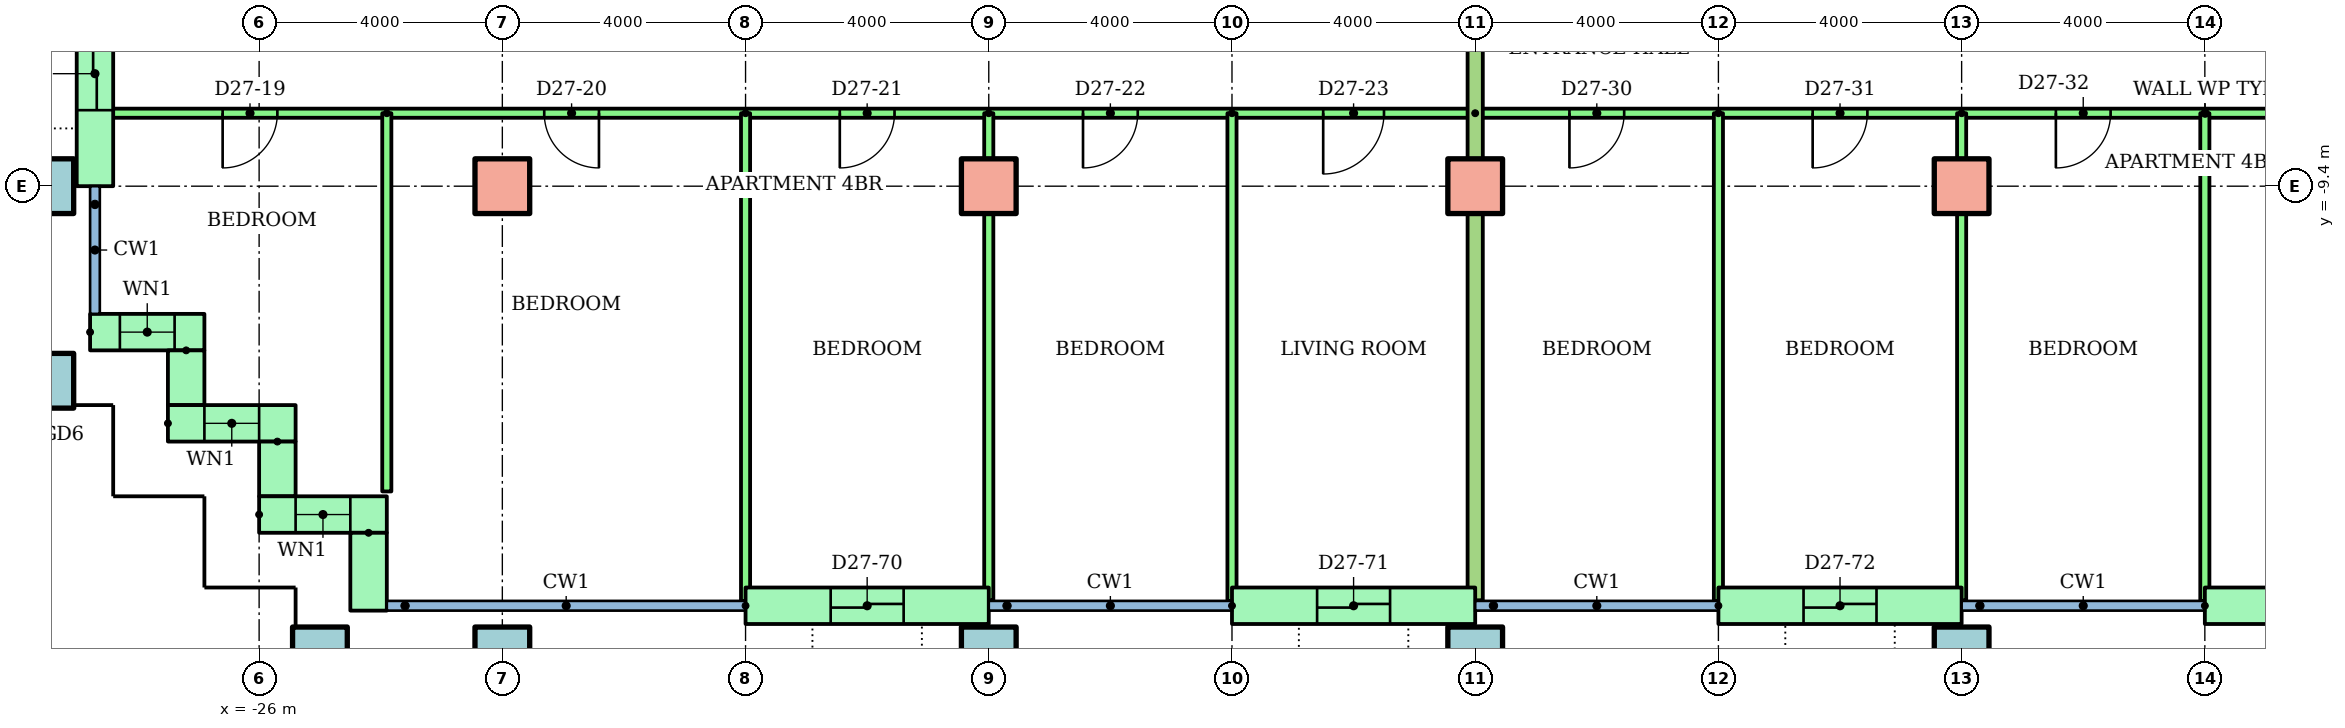
"""IFC4 building model, lengths in metres.
Left out: names, types, materials, properties, quantities, classifications, styles, units other than length and angle.
Written with IfcOpenShell. Run it as: python <this file> out.ifc"""

import sys

from ifc_helpers import new_model, si_unit, direction, frame, frame_2d, origin, origin_2d, place, context, subcontext, project, spatial, rectangle, hollow_rectangle, extrude, element, fill, save


model = new_model("IFC4")
c1 = context("Model", 3, precision=1e-05, world=origin(), true_north=direction((0.0, 1.0)))
c2 = subcontext(c1, "Body", "Model", "MODEL_VIEW")
j1 = project(units=[si_unit("LENGTHUNIT", "METRE"), si_unit("PLANEANGLEUNIT", "RADIAN")], contexts=[c1])
p1 = place(None, origin())
s1 = spatial("IfcSite", under=j1, at=p1, CompositionType="ELEMENT")
p2 = place(p1, origin())
s2 = spatial("IfcBuilding", under=s1, at=p2, CompositionType="ELEMENT")
p3 = place(p2, frame((0.0, 0.0, 103.1)))
s3 = spatial("IfcBuildingStorey", under=s2, at=p3, CompositionType="ELEMENT", Elevation=103.1)
for number, where in (
    (1, (-25.0, -17.1, 0.0)),
    (2, (-22.0, -17.1, 0.0)),
    (3, (-14.0, -17.1, 0.0)),
    (4, (-6.0, -17.1, 0.0)),
    (5, (2.0, -17.1, 0.0)),
    (6, (-29.5, -12.6, 0.0)),
    (7, (-29.5, -9.4, 0.0)),
):
    element("IfcColumn", number, at=place(p3, frame(where)), inside=s3, PredefinedType="COLUMN", context=c2, shape_type="SweptSolid", body=[
        extrude(hollow_rectangle(XDim=0.9, YDim=0.9, WallThickness=0.045, at=origin_2d()), origin(), (0.0, 0.0, 1.0), 3.2),
    ])
for number, where in (
    (8, (-22.0, -9.4, 0.0)),
    (9, (-14.0, -9.4, 0.0)),
    (10, (-6.0, -9.4, 0.0)),
    (11, (2.0, -9.4, 0.0)),
):
    element("IfcColumn", number, at=place(p3, frame(where)), inside=s3, PredefinedType="COLUMN", context=c2, shape_type="SweptSolid", body=[
        extrude(rectangle(XDim=0.9, YDim=0.9, at=origin_2d()), origin(), (0.0, 0.0, 1.0), 3.2),
    ])
p4 = place(p3, frame((-28.7, -5.7, 0.0), z_axis=(0.0, 0.0, 1.0), x_axis=(0.0, -1.0, 0.0)))
e12 = element("IfcWall", 12, at=p4, inside=s3, PredefinedType="STANDARD", context=c2, shape_type="SweptSolid", body=[
    extrude(rectangle(XDim=3.7, YDim=0.6, at=frame_2d((1.85, 0.0))), origin(), (0.0, 0.0, 1.0), 2.8),
])
p5 = place(p4, frame((1.25, 0.0, 0.0)))
e13 = element("IfcOpeningElement", 13, at=p5, cuts=e12, PredefinedType="OPENING", context=c2, shape_type="SweptSolid", body=[
    extrude(rectangle(XDim=1.2, YDim=2.1, at=frame_2d((0.6, 1.05))), frame((0.0, 0.31, 0.0), z_axis=(0.0, -1.0, 0.0), x_axis=(1.0, 0.0, 0.0)), (0.0, 0.0, 1.0), 0.62),
])
p6 = place(p3, frame((-28.78, -11.8, 0.0)))
e14 = element("IfcWall", 14, at=p6, inside=s3, PredefinedType="STANDARD", context=c2, shape_type="SweptSolid", body=[
    extrude(rectangle(XDim=1.88, YDim=0.6, at=frame_2d((0.94, 0.0))), origin(), (0.0, 0.0, 1.0), 2.8),
])
p7 = place(p6, frame((0.49, 0.0, 0.9)))
e15 = element("IfcOpeningElement", 15, at=p7, cuts=e14, PredefinedType="OPENING", context=c2, shape_type="SweptSolid", body=[
    extrude(rectangle(XDim=0.9, YDim=1.5, at=frame_2d((0.45, 0.75))), frame((0.0, 0.31, 0.0), z_axis=(0.0, -1.0, 0.0), x_axis=(1.0, 0.0, 0.0)), (0.0, 0.0, 1.0), 0.62),
])
p8 = place(p3, frame((-27.2, -12.1, 0.0), z_axis=(0.0, 0.0, 1.0), x_axis=(0.0, -1.0, 0.0)))
e16 = element("IfcWall", 16, at=p8, inside=s3, PredefinedType="STANDARD", context=c2, shape_type="SweptSolid", body=[
    extrude(rectangle(XDim=0.9, YDim=0.6, at=frame_2d((0.45, 0.0))), origin(), (0.0, 0.0, 1.0), 2.8),
])
p9 = place(p3, frame((-27.5, -13.3, 0.0)))
e17 = element("IfcWall", 17, at=p9, inside=s3, PredefinedType="STANDARD", context=c2, shape_type="SweptSolid", body=[
    extrude(rectangle(XDim=2.1, YDim=0.6, at=frame_2d((1.05, 0.0))), origin(), (0.0, 0.0, 1.0), 2.8),
])
p10 = place(p9, frame((0.6, 0.0, 0.9)))
e18 = element("IfcOpeningElement", 18, at=p10, cuts=e17, PredefinedType="OPENING", context=c2, shape_type="SweptSolid", body=[
    extrude(rectangle(XDim=0.9, YDim=1.5, at=frame_2d((0.45, 0.75))), frame((0.0, 0.31, 0.0), z_axis=(0.0, -1.0, 0.0), x_axis=(1.0, 0.0, 0.0)), (0.0, 0.0, 1.0), 0.62),
])
p11 = place(p3, frame((-25.7, -13.6, 0.0), z_axis=(0.0, 0.0, 1.0), x_axis=(0.0, -1.0, 0.0)))
e19 = element("IfcWall", 19, at=p11, inside=s3, PredefinedType="STANDARD", context=c2, shape_type="SweptSolid", body=[
    extrude(rectangle(XDim=0.9, YDim=0.6, at=frame_2d((0.45, 0.0))), origin(), (0.0, 0.0, 1.0), 2.8),
])
p12 = place(p3, frame((-26.0, -14.8, 0.0)))
e20 = element("IfcWall", 20, at=p12, inside=s3, PredefinedType="STANDARD", context=c2, shape_type="SweptSolid", body=[
    extrude(rectangle(XDim=2.1, YDim=0.6, at=frame_2d((1.05, 0.0))), origin(), (0.0, 0.0, 1.0), 2.8),
])
p13 = place(p12, frame((0.6, 0.0, 0.9)))
e21 = element("IfcOpeningElement", 21, at=p13, cuts=e20, PredefinedType="OPENING", context=c2, shape_type="SweptSolid", body=[
    extrude(rectangle(XDim=0.9, YDim=1.5, at=frame_2d((0.45, 0.75))), frame((0.0, 0.31, 0.0), z_axis=(0.0, -1.0, 0.0), x_axis=(1.0, 0.0, 0.0)), (0.0, 0.0, 1.0), 0.62),
])
p14 = place(p3, frame((-24.2, -15.1, 0.0), z_axis=(0.0, 0.0, 1.0), x_axis=(0.0, -1.0, 0.0)))
e22 = element("IfcWall", 22, at=p14, inside=s3, PredefinedType="STANDARD", context=c2, shape_type="SweptSolid", body=[
    extrude(rectangle(XDim=1.28, YDim=0.6, at=frame_2d((0.64, 0.0))), origin(), (0.0, 0.0, 1.0), 2.8),
])
p15 = place(p3, frame((-18.0, -16.3, 0.0)))
e23 = element("IfcWall", 23, at=p15, inside=s3, PredefinedType="STANDARD", context=c2, shape_type="SweptSolid", body=[
    extrude(rectangle(XDim=4.0, YDim=0.6, at=frame_2d((2.0, 0.0))), origin(), (0.0, 0.0, 1.0), 2.8),
])
p16 = place(p15, frame((1.4, 0.0, 0.0)))
e24 = element("IfcOpeningElement", 24, at=p16, cuts=e23, PredefinedType="OPENING", context=c2, shape_type="SweptSolid", body=[
    extrude(rectangle(XDim=1.2, YDim=2.1, at=frame_2d((0.6, 1.05))), frame((0.0, 0.31, 0.0), z_axis=(0.0, -1.0, 0.0), x_axis=(1.0, 0.0, 0.0)), (0.0, 0.0, 1.0), 0.62),
])
p17 = place(p3, frame((-10.0, -16.3, 0.0)))
e25 = element("IfcWall", 25, at=p17, inside=s3, PredefinedType="STANDARD", context=c2, shape_type="SweptSolid", body=[
    extrude(rectangle(XDim=4.0, YDim=0.6, at=frame_2d((2.0, 0.0))), origin(), (0.0, 0.0, 1.0), 2.8),
])
p18 = place(p17, frame((1.4, 0.0, 0.0)))
e26 = element("IfcOpeningElement", 26, at=p18, cuts=e25, PredefinedType="OPENING", context=c2, shape_type="SweptSolid", body=[
    extrude(rectangle(XDim=1.2, YDim=2.1, at=frame_2d((0.6, 1.05))), frame((0.0, 0.31, 0.0), z_axis=(0.0, -1.0, 0.0), x_axis=(1.0, 0.0, 0.0)), (0.0, 0.0, 1.0), 0.62),
])
p19 = place(p3, frame((-2.0, -16.3, 0.0)))
e27 = element("IfcWall", 27, at=p19, inside=s3, PredefinedType="STANDARD", context=c2, shape_type="SweptSolid", body=[
    extrude(rectangle(XDim=4.0, YDim=0.6, at=frame_2d((2.0, 0.0))), origin(), (0.0, 0.0, 1.0), 2.8),
])
p20 = place(p19, frame((1.4, 0.0, 0.0)))
e28 = element("IfcOpeningElement", 28, at=p20, cuts=e27, PredefinedType="OPENING", context=c2, shape_type="SweptSolid", body=[
    extrude(rectangle(XDim=1.2, YDim=2.1, at=frame_2d((0.6, 1.05))), frame((0.0, 0.31, 0.0), z_axis=(0.0, -1.0, 0.0), x_axis=(1.0, 0.0, 0.0)), (0.0, 0.0, 1.0), 0.62),
])
p21 = place(p3, frame((6.0, -16.3, 0.0)))
e29 = element("IfcWall", 29, at=p21, inside=s3, PredefinedType="STANDARD", context=c2, shape_type="SweptSolid", body=[
    extrude(rectangle(XDim=4.0, YDim=0.6, at=frame_2d((2.0, 0.0))), origin(), (0.0, 0.0, 1.0), 2.8),
])
p22 = place(p21, frame((1.4, 0.0, 0.0)))
e30 = element("IfcOpeningElement", 30, at=p22, cuts=e29, PredefinedType="OPENING", context=c2, shape_type="SweptSolid", body=[
    extrude(rectangle(XDim=1.2, YDim=2.1, at=frame_2d((0.6, 1.05))), frame((0.0, 0.31, 0.0), z_axis=(0.0, -1.0, 0.0), x_axis=(1.0, 0.0, 0.0)), (0.0, 0.0, 1.0), 0.62),
])
p23 = place(p3, frame((-6.0, -8.2, 0.0), z_axis=(0.0, 0.0, 1.0), x_axis=(-1.0, 0.0, 0.0)))
e31 = element("IfcWall", 31, at=p23, inside=s3, PredefinedType="PARTITIONING", context=c2, shape_type="SweptSolid", body=[
    extrude(rectangle(XDim=22.61, YDim=0.15, at=frame_2d((11.305, 0.0))), origin(), (0.0, 0.0, 1.0), 2.4),
])
p24 = place(p23, frame((19.7, 0.0, 0.0)))
e32 = element("IfcOpeningElement", 32, at=p24, cuts=e31, PredefinedType="OPENING", context=c2, shape_type="SweptSolid", body=[
    extrude(rectangle(XDim=0.9, YDim=2.1, at=frame_2d((0.45, 1.05))), frame((0.0, 0.085, 0.0), z_axis=(0.0, -1.0, 0.0), x_axis=(1.0, 0.0, 0.0)), (0.0, 0.0, 1.0), 0.17),
])
p25 = place(p23, frame((14.411, 0.0, 0.0)))
e33 = element("IfcOpeningElement", 33, at=p25, cuts=e31, PredefinedType="OPENING", context=c2, shape_type="SweptSolid", body=[
    extrude(rectangle(XDim=0.9, YDim=2.1, at=frame_2d((0.45, 1.05))), frame((0.0, 0.085, 0.0), z_axis=(0.0, -1.0, 0.0), x_axis=(1.0, 0.0, 0.0)), (0.0, 0.0, 1.0), 0.17),
])
p26 = place(p23, frame((9.55, 0.0, 0.0)))
e34 = element("IfcOpeningElement", 34, at=p26, cuts=e31, PredefinedType="OPENING", context=c2, shape_type="SweptSolid", body=[
    extrude(rectangle(XDim=0.9, YDim=2.1, at=frame_2d((0.45, 1.05))), frame((0.0, 0.085, 0.0), z_axis=(0.0, -1.0, 0.0), x_axis=(1.0, 0.0, 0.0)), (0.0, 0.0, 1.0), 0.17),
])
p27 = place(p23, frame((5.55, 0.0, 0.0)))
e35 = element("IfcOpeningElement", 35, at=p27, cuts=e31, PredefinedType="OPENING", context=c2, shape_type="SweptSolid", body=[
    extrude(rectangle(XDim=0.9, YDim=2.1, at=frame_2d((0.45, 1.05))), frame((0.0, 0.085, 0.0), z_axis=(0.0, -1.0, 0.0), x_axis=(1.0, 0.0, 0.0)), (0.0, 0.0, 1.0), 0.17),
])
p28 = place(p23, frame((1.5, 0.0, 0.0)))
e36 = element("IfcOpeningElement", 36, at=p28, cuts=e31, PredefinedType="OPENING", context=c2, shape_type="SweptSolid", body=[
    extrude(rectangle(XDim=1.0, YDim=2.1, at=frame_2d((0.5, 1.05))), frame((0.0, 0.085, 0.0), z_axis=(0.0, -1.0, 0.0), x_axis=(1.0, 0.0, 0.0)), (0.0, 0.0, 1.0), 0.17),
])
p29 = place(p3, frame((-23.9, -8.2, 0.0), z_axis=(0.0, 0.0, 1.0), x_axis=(0.0, -1.0, 0.0)))
e37 = element("IfcWall", 37, at=p29, inside=s3, PredefinedType="PARTITIONING", context=c2, shape_type="SweptSolid", body=[
    extrude(rectangle(XDim=6.22, YDim=0.15, at=frame_2d((3.11, 0.0))), origin(), (0.0, 0.0, 1.0), 2.4),
])
p30 = place(p3, frame((-18.0, -8.2, 0.0), z_axis=(0.0, 0.0, 1.0), x_axis=(0.0, -1.0, 0.0)))
e38 = element("IfcWall", 38, at=p30, inside=s3, PredefinedType="PARTITIONING", context=c2, shape_type="SweptSolid", body=[
    extrude(rectangle(XDim=8.021, YDim=0.15, at=frame_2d((4.01, 0.0))), origin(), (0.0, 0.0, 1.0), 2.4),
])
p31 = place(p3, frame((-14.0, -8.2, 0.0), z_axis=(0.0, 0.0, 1.0), x_axis=(0.0, -1.0, 0.0)))
e39 = element("IfcWall", 39, at=p31, inside=s3, PredefinedType="PARTITIONING", context=c2, shape_type="SweptSolid", body=[
    extrude(rectangle(XDim=8.01, YDim=0.15, at=frame_2d((4.005, 0.0))), origin(), (0.0, 0.0, 1.0), 2.4),
])
p32 = place(p3, frame((-10.0, -8.2, 0.0), z_axis=(0.0, 0.0, 1.0), x_axis=(0.0, -1.0, 0.0)))
e40 = element("IfcWall", 40, at=p32, inside=s3, PredefinedType="PARTITIONING", context=c2, shape_type="SweptSolid", body=[
    extrude(rectangle(XDim=8.021, YDim=0.15, at=frame_2d((4.01, 0.0))), origin(), (0.0, 0.0, 1.0), 2.4),
])
p33 = place(p3, frame((18.0, -8.2, 0.0), z_axis=(0.0, 0.0, 1.0), x_axis=(-1.0, 0.0, 0.0)))
e41 = element("IfcWall", 41, at=p33, inside=s3, PredefinedType="PARTITIONING", context=c2, shape_type="SweptSolid", body=[
    extrude(rectangle(XDim=24.0, YDim=0.15, at=frame_2d((12.0, 0.0))), origin(), (0.0, 0.0, 1.0), 2.4),
])
p34 = place(p33, frame((21.55, 0.0, 0.0)))
e42 = element("IfcOpeningElement", 42, at=p34, cuts=e41, PredefinedType="OPENING", context=c2, shape_type="SweptSolid", body=[
    extrude(rectangle(XDim=0.9, YDim=2.1, at=frame_2d((0.45, 1.05))), frame((0.0, 0.085, 0.0), z_axis=(0.0, -1.0, 0.0), x_axis=(1.0, 0.0, 0.0)), (0.0, 0.0, 1.0), 0.17),
])
p35 = place(p33, frame((17.55, 0.0, 0.0)))
e43 = element("IfcOpeningElement", 43, at=p35, cuts=e41, PredefinedType="OPENING", context=c2, shape_type="SweptSolid", body=[
    extrude(rectangle(XDim=0.9, YDim=2.1, at=frame_2d((0.45, 1.05))), frame((0.0, 0.085, 0.0), z_axis=(0.0, -1.0, 0.0), x_axis=(1.0, 0.0, 0.0)), (0.0, 0.0, 1.0), 0.17),
])
p36 = place(p33, frame((13.55, 0.0, 0.0)))
e44 = element("IfcOpeningElement", 44, at=p36, cuts=e41, PredefinedType="OPENING", context=c2, shape_type="SweptSolid", body=[
    extrude(rectangle(XDim=0.9, YDim=2.1, at=frame_2d((0.45, 1.05))), frame((0.0, 0.085, 0.0), z_axis=(0.0, -1.0, 0.0), x_axis=(1.0, 0.0, 0.0)), (0.0, 0.0, 1.0), 0.17),
])
p37 = place(p33, frame((9.55, 0.0, 0.0)))
e45 = element("IfcOpeningElement", 45, at=p37, cuts=e41, PredefinedType="OPENING", context=c2, shape_type="SweptSolid", body=[
    extrude(rectangle(XDim=0.9, YDim=2.1, at=frame_2d((0.45, 1.05))), frame((0.0, 0.085, 0.0), z_axis=(0.0, -1.0, 0.0), x_axis=(1.0, 0.0, 0.0)), (0.0, 0.0, 1.0), 0.17),
])
p38 = place(p33, frame((3.5, 0.0, 0.0)))
e46 = element("IfcOpeningElement", 46, at=p38, cuts=e41, PredefinedType="OPENING", context=c2, shape_type="SweptSolid", body=[
    extrude(rectangle(XDim=1.0, YDim=2.1, at=frame_2d((0.5, 1.05))), frame((0.0, 0.085, 0.0), z_axis=(0.0, -1.0, 0.0), x_axis=(1.0, 0.0, 0.0)), (0.0, 0.0, 1.0), 0.17),
])
p39 = place(p3, frame((-2.0, -8.2, 0.0), z_axis=(0.0, 0.0, 1.0), x_axis=(0.0, -1.0, 0.0)))
e47 = element("IfcWall", 47, at=p39, inside=s3, PredefinedType="PARTITIONING", context=c2, shape_type="SweptSolid", body=[
    extrude(rectangle(XDim=8.021, YDim=0.15, at=frame_2d((4.01, 0.0))), origin(), (0.0, 0.0, 1.0), 2.4),
])
p40 = place(p3, frame((2.0, -8.2, 0.0), z_axis=(0.0, 0.0, 1.0), x_axis=(0.0, -1.0, 0.0)))
e48 = element("IfcWall", 48, at=p40, inside=s3, PredefinedType="PARTITIONING", context=c2, shape_type="SweptSolid", body=[
    extrude(rectangle(XDim=8.01, YDim=0.15, at=frame_2d((4.005, 0.0))), origin(), (0.0, 0.0, 1.0), 2.4),
])
p41 = place(p3, frame((6.0, -8.2, 0.0), z_axis=(0.0, 0.0, 1.0), x_axis=(0.0, -1.0, 0.0)))
e49 = element("IfcWall", 49, at=p41, inside=s3, PredefinedType="PARTITIONING", context=c2, shape_type="SweptSolid", body=[
    extrude(rectangle(XDim=8.021, YDim=0.15, at=frame_2d((4.01, 0.0))), origin(), (0.0, 0.0, 1.0), 2.4),
])
p42 = place(p3, frame((-6.0, -1.4, 0.0), z_axis=(0.0, 0.0, 1.0), x_axis=(0.0, -1.0, 0.0)))
e50 = element("IfcWall", 50, at=p42, inside=s3, PredefinedType="PARTITIONING", context=c2, shape_type="SweptSolid", body=[
    extrude(rectangle(XDim=14.81, YDim=0.25, at=frame_2d((7.405, 0.0))), origin(), (0.0, 0.0, 1.0), 2.4),
])
p43 = place(p7, origin())
e51 = element("IfcWindow", 51, at=p43, inside=s3, PartitioningType="SINGLE_PANEL", PredefinedType="WINDOW", context=c2, shape_type="SweptSolid", body=[
    extrude(rectangle(XDim=0.9, YDim=1.5, at=frame_2d((0.45, 0.75))), frame((0.0, 0.03, 0.0), z_axis=(0.0, -1.0, 0.0), x_axis=(1.0, 0.0, 0.0)), (0.0, 0.0, 1.0), 0.06),
])
fill(e15, e51)
p44 = place(p10, origin())
e52 = element("IfcWindow", 52, at=p44, inside=s3, PartitioningType="SINGLE_PANEL", PredefinedType="WINDOW", context=c2, shape_type="SweptSolid", body=[
    extrude(rectangle(XDim=0.9, YDim=1.5, at=frame_2d((0.45, 0.75))), frame((0.0, 0.03, 0.0), z_axis=(0.0, -1.0, 0.0), x_axis=(1.0, 0.0, 0.0)), (0.0, 0.0, 1.0), 0.06),
])
fill(e18, e52)
p45 = place(p13, origin())
e53 = element("IfcWindow", 53, at=p45, inside=s3, PartitioningType="SINGLE_PANEL", PredefinedType="WINDOW", context=c2, shape_type="SweptSolid", body=[
    extrude(rectangle(XDim=0.9, YDim=1.5, at=frame_2d((0.45, 0.75))), frame((0.0, 0.03, 0.0), z_axis=(0.0, -1.0, 0.0), x_axis=(1.0, 0.0, 0.0)), (0.0, 0.0, 1.0), 0.06),
])
fill(e21, e53)
p46 = place(p24, origin())
e54 = element("IfcDoor", 54, at=p46, inside=s3, OperationType="SINGLE_SWING_RIGHT", PredefinedType="DOOR", context=c2, shape_type="SweptSolid", body=[
    extrude(rectangle(XDim=0.9, YDim=2.1, at=frame_2d((0.45, 1.05))), frame((0.0, 0.025, 0.0), z_axis=(0.0, -1.0, 0.0), x_axis=(1.0, 0.0, 0.0)), (0.0, 0.0, 1.0), 0.05),
])
fill(e32, e54)
p47 = place(p25, origin())
e55 = element("IfcDoor", 55, at=p47, inside=s3, OperationType="SINGLE_SWING_LEFT", PredefinedType="DOOR", context=c2, shape_type="SweptSolid", body=[
    extrude(rectangle(XDim=0.9, YDim=2.1, at=frame_2d((0.45, 1.05))), frame((0.0, 0.025, 0.0), z_axis=(0.0, -1.0, 0.0), x_axis=(1.0, 0.0, 0.0)), (0.0, 0.0, 1.0), 0.05),
])
fill(e33, e55)
p48 = place(p26, origin())
e56 = element("IfcDoor", 56, at=p48, inside=s3, OperationType="SINGLE_SWING_RIGHT", PredefinedType="DOOR", context=c2, shape_type="SweptSolid", body=[
    extrude(rectangle(XDim=0.9, YDim=2.1, at=frame_2d((0.45, 1.05))), frame((0.0, 0.025, 0.0), z_axis=(0.0, -1.0, 0.0), x_axis=(1.0, 0.0, 0.0)), (0.0, 0.0, 1.0), 0.05),
])
fill(e34, e56)
p49 = place(p27, origin())
e57 = element("IfcDoor", 57, at=p49, inside=s3, OperationType="SINGLE_SWING_RIGHT", PredefinedType="DOOR", context=c2, shape_type="SweptSolid", body=[
    extrude(rectangle(XDim=0.9, YDim=2.1, at=frame_2d((0.45, 1.05))), frame((0.0, 0.025, 0.0), z_axis=(0.0, -1.0, 0.0), x_axis=(1.0, 0.0, 0.0)), (0.0, 0.0, 1.0), 0.05),
])
fill(e35, e57)
p50 = place(p28, origin())
e58 = element("IfcDoor", 58, at=p50, inside=s3, OperationType="SINGLE_SWING_RIGHT", PredefinedType="DOOR", context=c2, shape_type="SweptSolid", body=[
    extrude(rectangle(XDim=1.0, YDim=2.1, at=frame_2d((0.5, 1.05))), frame((0.0, 0.025, 0.0), z_axis=(0.0, -1.0, 0.0), x_axis=(1.0, 0.0, 0.0)), (0.0, 0.0, 1.0), 0.05),
])
fill(e36, e58)
p51 = place(p34, origin())
e59 = element("IfcDoor", 59, at=p51, inside=s3, OperationType="SINGLE_SWING_RIGHT", PredefinedType="DOOR", context=c2, shape_type="SweptSolid", body=[
    extrude(rectangle(XDim=0.9, YDim=2.1, at=frame_2d((0.45, 1.05))), frame((0.0, 0.025, 0.0), z_axis=(0.0, -1.0, 0.0), x_axis=(1.0, 0.0, 0.0)), (0.0, 0.0, 1.0), 0.05),
])
fill(e42, e59)
p52 = place(p35, origin())
e60 = element("IfcDoor", 60, at=p52, inside=s3, OperationType="SINGLE_SWING_RIGHT", PredefinedType="DOOR", context=c2, shape_type="SweptSolid", body=[
    extrude(rectangle(XDim=0.9, YDim=2.1, at=frame_2d((0.45, 1.05))), frame((0.0, 0.025, 0.0), z_axis=(0.0, -1.0, 0.0), x_axis=(1.0, 0.0, 0.0)), (0.0, 0.0, 1.0), 0.05),
])
fill(e43, e60)
p53 = place(p36, origin())
e61 = element("IfcDoor", 61, at=p53, inside=s3, OperationType="SINGLE_SWING_RIGHT", PredefinedType="DOOR", context=c2, shape_type="SweptSolid", body=[
    extrude(rectangle(XDim=0.9, YDim=2.1, at=frame_2d((0.45, 1.05))), frame((0.0, 0.025, 0.0), z_axis=(0.0, -1.0, 0.0), x_axis=(1.0, 0.0, 0.0)), (0.0, 0.0, 1.0), 0.05),
])
fill(e44, e61)
p54 = place(p5, origin())
e62 = element("IfcDoor", 62, at=p54, inside=s3, OperationType="SLIDING_TO_LEFT", PredefinedType="DOOR", context=c2, shape_type="SweptSolid", body=[
    extrude(rectangle(XDim=1.2, YDim=2.1, at=frame_2d((0.6, 1.05))), frame((0.0, 0.025, 0.0), z_axis=(0.0, -1.0, 0.0), x_axis=(1.0, 0.0, 0.0)), (0.0, 0.0, 1.0), 0.05),
])
fill(e13, e62)
p55 = place(p16, origin())
e63 = element("IfcDoor", 63, at=p55, inside=s3, OperationType="SLIDING_TO_LEFT", PredefinedType="DOOR", context=c2, shape_type="SweptSolid", body=[
    extrude(rectangle(XDim=1.2, YDim=2.1, at=frame_2d((0.6, 1.05))), frame((0.0, 0.025, 0.0), z_axis=(0.0, -1.0, 0.0), x_axis=(1.0, 0.0, 0.0)), (0.0, 0.0, 1.0), 0.05),
])
fill(e24, e63)
p56 = place(p18, origin())
e64 = element("IfcDoor", 64, at=p56, inside=s3, OperationType="SLIDING_TO_LEFT", PredefinedType="DOOR", context=c2, shape_type="SweptSolid", body=[
    extrude(rectangle(XDim=1.2, YDim=2.1, at=frame_2d((0.6, 1.05))), frame((0.0, 0.025, 0.0), z_axis=(0.0, -1.0, 0.0), x_axis=(1.0, 0.0, 0.0)), (0.0, 0.0, 1.0), 0.05),
])
fill(e26, e64)
p57 = place(p20, origin())
e65 = element("IfcDoor", 65, at=p57, inside=s3, OperationType="SLIDING_TO_LEFT", PredefinedType="DOOR", context=c2, shape_type="SweptSolid", body=[
    extrude(rectangle(XDim=1.2, YDim=2.1, at=frame_2d((0.6, 1.05))), frame((0.0, 0.025, 0.0), z_axis=(0.0, -1.0, 0.0), x_axis=(1.0, 0.0, 0.0)), (0.0, 0.0, 1.0), 0.05),
])
fill(e28, e65)
save(model, sys.argv[1])
